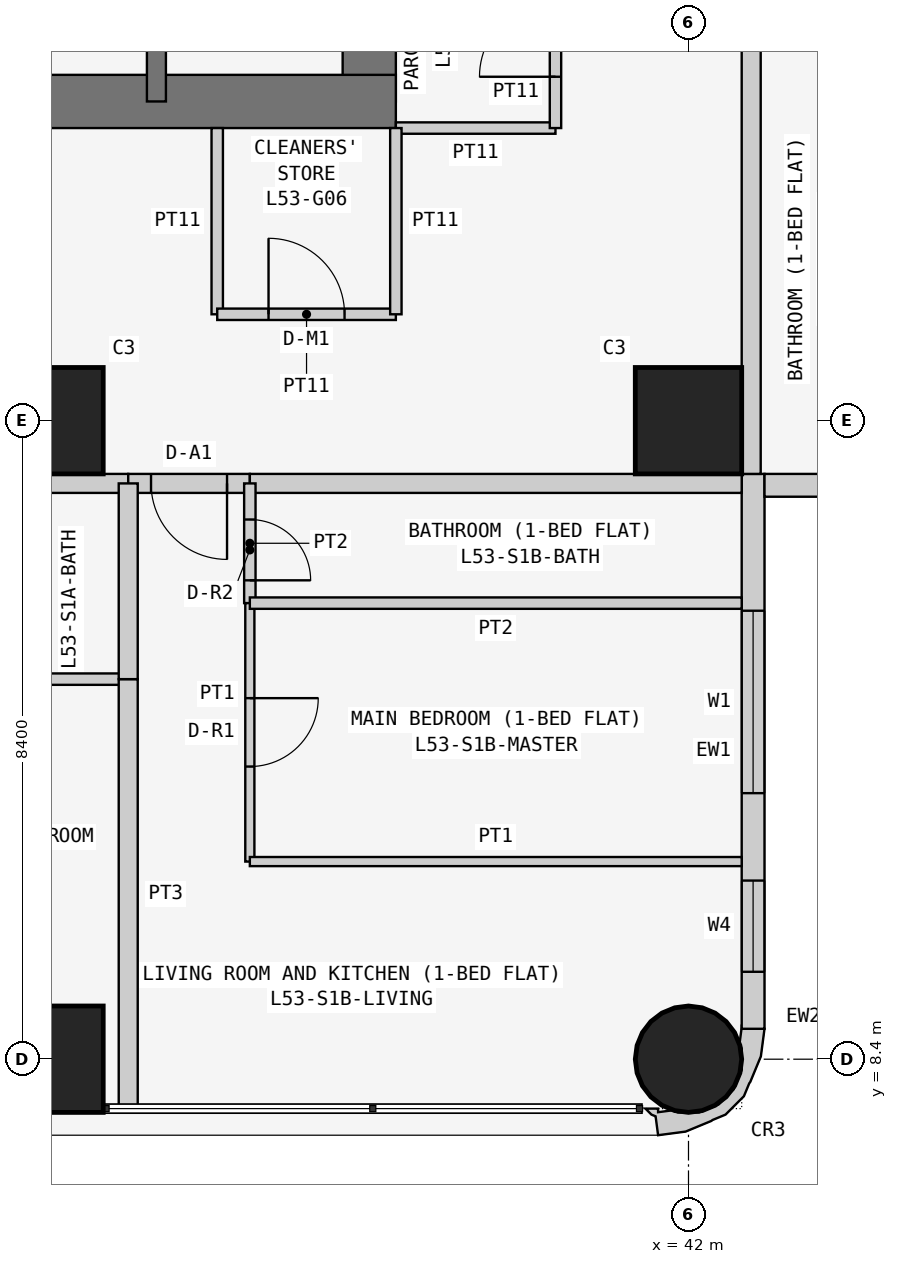
"""IFC4 building model, lengths in metres.
Left out: names, types, materials, properties, quantities, classifications, styles, units other than length and angle.
Written with IfcOpenShell. Run it as: python <this file> out.ifc"""

import sys

from ifc_helpers import new_model, si_unit, direction, frame, frame_2d, origin, origin_2d, place, context, subcontext, project, spatial, polyline, rectangle, circle, outline, extrude, element, fill, save


model = new_model("IFC4")
c1 = context("Model", 3, precision=1e-05, world=origin(), true_north=direction((0.0, 1.0)))
c2 = subcontext(c1, "Body", "Model", "MODEL_VIEW")
j1 = project(units=[si_unit("LENGTHUNIT", "METRE"), si_unit("PLANEANGLEUNIT", "RADIAN")], contexts=[c1])
p1 = place(None, origin())
s1 = spatial("IfcSite", under=j1, at=p1, CompositionType="ELEMENT")
p2 = place(p1, origin())
s2 = spatial("IfcBuilding", under=s1, at=p2, CompositionType="ELEMENT")
p3 = place(p2, frame((0.0, 0.0, 204.9)))
s3 = spatial("IfcBuildingStorey", under=s2, at=p3, CompositionType="ELEMENT", Elevation=204.9)
for number, where, z_axis, x_axis in (
    (1, (33.6, 8.4, 0.0), (0.0, 0.0, 1.0), (1.0, 0.0, 0.0)),
    (2, (33.6, 16.8, 0.0), (0.0, 0.0, 1.0), (1.0, 0.0, 0.0)),
):
    element("IfcColumn", number, at=place(p3, frame(where, z_axis=z_axis, x_axis=x_axis)), inside=s3, PredefinedType="COLUMN", context=c2, shape_type="SweptSolid", body=[
        extrude(rectangle(XDim=1.4, YDim=1.4, at=origin_2d()), origin(), (0.0, 0.0, 1.0), 3.6),
    ])
p4 = place(p3, frame((42.0, 8.4, 0.0), z_axis=(0.0, 0.0, 1.0), x_axis=(1.0, 0.0, 0.0)))
e3 = element("IfcColumn", 3, at=p4, inside=s3, PredefinedType="COLUMN", context=c2, shape_type="SweptSolid", body=[
    extrude(circle(Radius=0.7, at=origin_2d()), origin(), (0.0, 0.0, 1.0), 3.6),
])
p5 = place(p3, frame((42.0, 16.8, 0.0), z_axis=(0.0, 0.0, 1.0), x_axis=(1.0, 0.0, 0.0)))
e4 = element("IfcColumn", 4, at=p5, inside=s3, PredefinedType="COLUMN", context=c2, shape_type="SweptSolid", body=[
    extrude(rectangle(XDim=1.4, YDim=1.4, at=origin_2d()), origin(), (0.0, 0.0, 1.0), 3.6),
])
p6 = place(p3, frame((21.0, 21.0, 0.0), z_axis=(0.0, 0.0, 1.0), x_axis=(1.0, 0.0, 0.0)))
e5 = element("IfcWall", 5, at=p6, inside=s3, PredefinedType="SHEAR", context=c2, shape_type="SweptSolid", body=[
    extrude(rectangle(XDim=17.15, YDim=0.7, at=frame_2d((8.575, 0.0))), origin(), (0.0, 0.0, 1.0), 3.6),
])
p7 = place(p3, frame((37.8, 21.0, 0.0), z_axis=(0.0, 0.0, 1.0), x_axis=(0.0, 1.0, 0.0)))
e6 = element("IfcWall", 6, at=p7, inside=s3, PredefinedType="SHEAR", context=c2, shape_type="SweptSolid", body=[
    extrude(rectangle(XDim=17.15, YDim=0.7, at=frame_2d((8.575, 0.0))), origin(), (0.0, 0.0, 1.0), 3.6),
])
p8 = place(p7, frame((5.2, 0.0, 0.0)))
e7 = element("IfcOpeningElement", 7, at=p8, cuts=e6, PredefinedType="OPENING", context=c2, shape_type="SweptSolid", body=[
    extrude(rectangle(XDim=1.2, YDim=2.1, at=frame_2d((0.6, 1.05))), frame((0.0, 0.36, 0.0), z_axis=(0.0, -1.0, 0.0), x_axis=(1.0, 0.0, 0.0)), (0.0, 0.0, 1.0), 0.72),
])
p9 = place(p3, frame((35.0, 21.0, 0.0), z_axis=(0.0, 0.0, 1.0), x_axis=(0.0, 1.0, 0.0)))
e8 = element("IfcWall", 8, at=p9, inside=s3, PredefinedType="SHEAR", context=c2, shape_type="SweptSolid", body=[
    extrude(rectangle(XDim=3.2, YDim=0.25, at=frame_2d((1.6, 0.0))), origin(), (0.0, 0.0, 1.0), 3.6),
])
p10 = place(p3, frame((42.85, 8.8, 0.0), z_axis=(0.0, 0.0, 1.0), x_axis=(0.0, 1.0, 0.0)))
e9 = element("IfcWall", 9, at=p10, inside=s3, PredefinedType="SOLIDWALL", context=c2, shape_type="SweptSolid", body=[
    extrude(rectangle(XDim=7.3, YDim=0.3, at=frame_2d((3.65, 0.0))), origin(), (0.0, 0.0, 1.0), 3.45),
])
p11 = place(p10, frame((3.1, 0.0, 0.9)))
e10 = element("IfcOpeningElement", 10, at=p11, cuts=e9, PredefinedType="OPENING", context=c2, shape_type="SweptSolid", body=[
    extrude(rectangle(XDim=2.4, YDim=1.5, at=frame_2d((1.2, 0.75))), frame((0.0, 0.16, 0.0), z_axis=(0.0, -1.0, 0.0), x_axis=(1.0, 0.0, 0.0)), (0.0, 0.0, 1.0), 0.32),
])
p12 = place(p10, frame((0.75, 0.0, 0.9)))
e11 = element("IfcOpeningElement", 11, at=p12, cuts=e9, PredefinedType="OPENING", context=c2, shape_type="SweptSolid", body=[
    extrude(rectangle(XDim=1.2, YDim=1.5, at=frame_2d((0.6, 0.75))), frame((0.0, 0.16, 0.0), z_axis=(0.0, -1.0, 0.0), x_axis=(1.0, 0.0, 0.0)), (0.0, 0.0, 1.0), 0.32),
])
p13 = place(p3, frame((43.0, 15.95, 0.0), z_axis=(0.0, 0.0, 1.0), x_axis=(1.0, 0.0, 0.0)))
e12 = element("IfcWall", 12, at=p13, inside=s3, PredefinedType="SOLIDWALL", context=c2, shape_type="SweptSolid", body=[
    extrude(rectangle(XDim=7.0, YDim=0.3, at=frame_2d((3.5, 0.0))), origin(), (0.0, 0.0, 1.0), 3.45),
])
p14 = place(p13, frame((1.5, 0.0, 0.9)))
e13 = element("IfcOpeningElement", 13, at=p14, cuts=e12, PredefinedType="OPENING", context=c2, shape_type="SweptSolid", body=[
    extrude(rectangle(XDim=2.4, YDim=1.5, at=frame_2d((1.2, 0.75))), frame((0.0, 0.16, 0.0), z_axis=(0.0, -1.0, 0.0), x_axis=(1.0, 0.0, 0.0)), (0.0, 0.0, 1.0), 0.32),
])
p15 = place(p13, frame((5.05, 0.0, 0.9)))
e14 = element("IfcOpeningElement", 14, at=p15, cuts=e12, PredefinedType="OPENING", context=c2, shape_type="SweptSolid", body=[
    extrude(rectangle(XDim=1.2, YDim=1.5, at=frame_2d((0.6, 0.75))), frame((0.0, 0.16, 0.0), z_axis=(0.0, -1.0, 0.0), x_axis=(1.0, 0.0, 0.0)), (0.0, 0.0, 1.0), 0.32),
])
p16 = place(p3, frame((41.488, 7.812, 0.0), z_axis=(0.0, 0.0, 1.0), x_axis=(0.439933741929, -0.898030234854, 0.0)))
e15 = element("IfcWall", 15, at=p16, inside=s3, PredefinedType="SOLIDWALL", context=c2, shape_type="SweptSolid", body=[
    extrude(outline(polyline([(-0.222, 1.793), (-0.39, 1.541), (-0.372, 1.532), (-0.195, 1.414), (-0.12, 1.41), (0.131, 1.287), (0.315, 1.078), (0.406, 0.814), (0.388, 0.536), (0.265, 0.285), (0.209, 0.235), (0.148, 0.053), (0.105, 0.074), (0.032, -0.076), (0.138, -0.04), (0.182, -0.0), (0.419, -0.08), (0.536, 0.266), (0.559, 0.631), (0.555, 0.651), (0.566, 0.836), (0.455, 1.159), (0.333, 1.298), (0.324, 1.317), (0.082, 1.591), (-0.222, 1.793)])), origin(), (0.0, 0.0, 1.0), 3.45),
])
p17 = place(p3, frame((38.15, 20.65, 0.0), z_axis=(0.0, 0.0, 1.0), x_axis=(1.0, 0.0, 0.0)))
e16 = element("IfcWall", 16, at=p17, inside=s3, PredefinedType="PARTITIONING", context=c2, shape_type="SweptSolid", body=[
    extrude(rectangle(XDim=2.1, YDim=0.15, at=frame_2d((1.05, 0.0))), origin(), (0.0, 0.0, 1.0), 3.45),
])
p18 = place(p3, frame((40.25, 20.65, 0.0), z_axis=(0.0, 0.0, 1.0), x_axis=(0.0, 1.0, 0.0)))
e17 = element("IfcWall", 17, at=p18, inside=s3, PredefinedType="PARTITIONING", context=c2, shape_type="SweptSolid", body=[
    extrude(rectangle(XDim=2.35, YDim=0.15, at=frame_2d((1.175, 0.0))), origin(), (0.0, 0.0, 1.0), 3.45),
])
p19 = place(p18, frame((0.675, 0.0, 0.0)))
e18 = element("IfcOpeningElement", 18, at=p19, cuts=e17, PredefinedType="OPENING", context=c2, shape_type="SweptSolid", body=[
    extrude(rectangle(XDim=1.0, YDim=2.1, at=frame_2d((0.5, 1.05))), frame((0.0, 0.085, 0.0), z_axis=(0.0, -1.0, 0.0), x_axis=(1.0, 0.0, 0.0)), (0.0, 0.0, 1.0), 0.17),
])
p20 = place(p3, frame((35.8, 20.65, 0.0), z_axis=(0.0, 0.0, 1.0), x_axis=(0.0, -1.0, 0.0)))
e19 = element("IfcWall", 19, at=p20, inside=s3, PredefinedType="PARTITIONING", context=c2, shape_type="SweptSolid", body=[
    extrude(rectangle(XDim=2.45, YDim=0.15, at=frame_2d((1.225, 0.0))), origin(), (0.0, 0.0, 1.0), 3.45),
])
p21 = place(p3, frame((35.8, 18.2, 0.0), z_axis=(0.0, 0.0, 1.0), x_axis=(1.0, 0.0, 0.0)))
e20 = element("IfcWall", 20, at=p21, inside=s3, PredefinedType="PARTITIONING", context=c2, shape_type="SweptSolid", body=[
    extrude(rectangle(XDim=2.35, YDim=0.15, at=frame_2d((1.175, 0.0))), origin(), (0.0, 0.0, 1.0), 3.45),
])
p22 = place(p21, frame((0.675, 0.0, 0.0)))
e21 = element("IfcOpeningElement", 21, at=p22, cuts=e20, PredefinedType="OPENING", context=c2, shape_type="SweptSolid", body=[
    extrude(rectangle(XDim=1.0, YDim=2.1, at=frame_2d((0.5, 1.05))), frame((0.0, 0.085, 0.0), z_axis=(0.0, -1.0, 0.0), x_axis=(1.0, 0.0, 0.0)), (0.0, 0.0, 1.0), 0.17),
])
p23 = place(p3, frame((38.15, 18.2, 0.0), z_axis=(0.0, 0.0, 1.0), x_axis=(0.0, 1.0, 0.0)))
e22 = element("IfcWall", 22, at=p23, inside=s3, PredefinedType="PARTITIONING", context=c2, shape_type="SweptSolid", body=[
    extrude(rectangle(XDim=2.45, YDim=0.15, at=frame_2d((1.225, 0.0))), origin(), (0.0, 0.0, 1.0), 3.45),
])
p24 = place(p3, frame((42.825, 22.971, 0.0), z_axis=(0.0, 0.0, 1.0), x_axis=(0.0, -1.0, 0.0)))
e23 = element("IfcWall", 23, at=p24, inside=s3, PredefinedType="PARTITIONING", context=c2, shape_type="SweptSolid", body=[
    extrude(rectangle(XDim=6.871, YDim=0.25, at=frame_2d((3.436, 0.0))), origin(), (0.0, 0.0, 1.0), 3.45),
])
p25 = place(p3, frame((34.629, 15.975, 0.0), z_axis=(0.0, 0.0, 1.0), x_axis=(-1.0, 0.0, 0.0)))
e24 = element("IfcWall", 24, at=p25, inside=s3, PredefinedType="PARTITIONING", context=c2, shape_type="SweptSolid", body=[
    extrude(rectangle(XDim=2.629, YDim=0.25, at=frame_2d((1.314, 0.0))), origin(), (0.0, 0.0, 1.0), 3.45),
])
p26 = place(p3, frame((36.229, 15.975, 0.0), z_axis=(0.0, 0.0, 1.0), x_axis=(-1.0, 0.0, 0.0)))
e25 = element("IfcWall", 25, at=p26, inside=s3, PredefinedType="PARTITIONING", context=c2, shape_type="SweptSolid", body=[
    extrude(rectangle(XDim=1.6, YDim=0.25, at=frame_2d((0.8, 0.0))), origin(), (0.0, 0.0, 1.0), 3.45),
])
p27 = place(p26, frame((0.3, 0.0, 0.0)))
e26 = element("IfcOpeningElement", 26, at=p27, cuts=e25, PredefinedType="OPENING", context=c2, shape_type="SweptSolid", body=[
    extrude(rectangle(XDim=1.0, YDim=2.1, at=frame_2d((0.5, 1.05))), frame((0.0, 0.135, 0.0), z_axis=(0.0, -1.0, 0.0), x_axis=(1.0, 0.0, 0.0)), (0.0, 0.0, 1.0), 0.27),
])
p28 = place(p3, frame((42.7, 15.975, 0.0), z_axis=(0.0, 0.0, 1.0), x_axis=(-1.0, 0.0, 0.0)))
e27 = element("IfcWall", 27, at=p28, inside=s3, PredefinedType="PARTITIONING", context=c2, shape_type="SweptSolid", body=[
    extrude(rectangle(XDim=6.471, YDim=0.25, at=frame_2d((3.235, 0.0))), origin(), (0.0, 0.0, 1.0), 3.45),
])
p29 = place(p3, frame((32.0, 13.4, 0.0), z_axis=(0.0, 0.0, 1.0), x_axis=(1.0, 0.0, 0.0)))
e28 = element("IfcWall", 28, at=p29, inside=s3, PredefinedType="PARTITIONING", context=c2, shape_type="SweptSolid", body=[
    extrude(rectangle(XDim=2.629, YDim=0.15, at=frame_2d((1.314, 0.0))), origin(), (0.0, 0.0, 1.0), 3.45),
])
p30 = place(p3, frame((34.629, 13.4, 0.0), z_axis=(0.0, 0.0, 1.0), x_axis=(0.0, -1.0, 0.0)))
e29 = element("IfcWall", 29, at=p30, inside=s3, PredefinedType="PARTITIONING", context=c2, shape_type="SweptSolid", body=[
    extrude(rectangle(XDim=5.65, YDim=0.25, at=frame_2d((2.825, 0.0))), origin(), (0.0, 0.0, 1.0), 3.45),
])
p31 = place(p3, frame((34.629, 13.4, 0.0), z_axis=(0.0, 0.0, 1.0), x_axis=(0.0, 1.0, 0.0)))
e30 = element("IfcWall", 30, at=p31, inside=s3, PredefinedType="PARTITIONING", context=c2, shape_type="SweptSolid", body=[
    extrude(rectangle(XDim=2.575, YDim=0.25, at=frame_2d((1.288, 0.0))), origin(), (0.0, 0.0, 1.0), 3.45),
])
p32 = place(p3, frame((36.229, 15.975, 0.0), z_axis=(0.0, 0.0, 1.0), x_axis=(0.0, -1.0, 0.0)))
e31 = element("IfcWall", 31, at=p32, inside=s3, PredefinedType="PARTITIONING", context=c2, shape_type="SweptSolid", body=[
    extrude(rectangle(XDim=1.575, YDim=0.15, at=frame_2d((0.788, 0.0))), origin(), (0.0, 0.0, 1.0), 3.45),
])
p33 = place(p32, frame((0.475, 0.0, 0.0)))
e32 = element("IfcOpeningElement", 32, at=p33, cuts=e31, PredefinedType="OPENING", context=c2, shape_type="SweptSolid", body=[
    extrude(rectangle(XDim=0.8, YDim=2.1, at=frame_2d((0.4, 1.05))), frame((0.0, 0.085, 0.0), z_axis=(0.0, -1.0, 0.0), x_axis=(1.0, 0.0, 0.0)), (0.0, 0.0, 1.0), 0.17),
])
p34 = place(p3, frame((36.229, 14.4, 0.0), z_axis=(0.0, 0.0, 1.0), x_axis=(0.0, -1.0, 0.0)))
e33 = element("IfcWall", 33, at=p34, inside=s3, PredefinedType="PARTITIONING", context=c2, shape_type="SweptSolid", body=[
    extrude(rectangle(XDim=3.4, YDim=0.12, at=frame_2d((1.7, 0.0))), origin(), (0.0, 0.0, 1.0), 3.45),
])
p35 = place(p34, frame((1.25, 0.0, 0.0)))
e34 = element("IfcOpeningElement", 34, at=p35, cuts=e33, PredefinedType="OPENING", context=c2, shape_type="SweptSolid", body=[
    extrude(rectangle(XDim=0.9, YDim=2.1, at=frame_2d((0.45, 1.05))), frame((0.0, 0.07, 0.0), z_axis=(0.0, -1.0, 0.0), x_axis=(1.0, 0.0, 0.0)), (0.0, 0.0, 1.0), 0.14),
])
p36 = place(p3, frame((36.229, 11.0, 0.0), z_axis=(0.0, 0.0, 1.0), x_axis=(1.0, 0.0, 0.0)))
e35 = element("IfcWall", 35, at=p36, inside=s3, PredefinedType="PARTITIONING", context=c2, shape_type="SweptSolid", body=[
    extrude(rectangle(XDim=6.471, YDim=0.12, at=frame_2d((3.235, 0.0))), origin(), (0.0, 0.0, 1.0), 3.45),
])
p37 = place(p3, frame((36.229, 14.4, 0.0), z_axis=(0.0, 0.0, 1.0), x_axis=(1.0, 0.0, 0.0)))
e36 = element("IfcWall", 36, at=p37, inside=s3, PredefinedType="PARTITIONING", context=c2, shape_type="SweptSolid", body=[
    extrude(rectangle(XDim=6.471, YDim=0.15, at=frame_2d((3.235, 0.0))), origin(), (0.0, 0.0, 1.0), 3.45),
])
p38 = place(p11, origin())
e37 = element("IfcWindow", 37, at=p38, inside=s3, PartitioningType="SINGLE_PANEL", PredefinedType="WINDOW", context=c2, shape_type="SweptSolid", body=[
    extrude(rectangle(XDim=2.4, YDim=1.5, at=frame_2d((1.2, 0.75))), frame((0.0, 0.03, 0.0), z_axis=(0.0, -1.0, 0.0), x_axis=(1.0, 0.0, 0.0)), (0.0, 0.0, 1.0), 0.06),
])
fill(e10, e37)
p39 = place(p12, origin())
e38 = element("IfcWindow", 38, at=p39, inside=s3, PartitioningType="SINGLE_PANEL", PredefinedType="WINDOW", context=c2, shape_type="SweptSolid", body=[
    extrude(rectangle(XDim=1.2, YDim=1.5, at=frame_2d((0.6, 0.75))), frame((0.0, 0.03, 0.0), z_axis=(0.0, -1.0, 0.0), x_axis=(1.0, 0.0, 0.0)), (0.0, 0.0, 1.0), 0.06),
])
fill(e11, e38)
p40 = place(p19, origin())
e39 = element("IfcDoor", 39, at=p40, inside=s3, OperationType="SINGLE_SWING_LEFT", PredefinedType="DOOR", context=c2, shape_type="SweptSolid", body=[
    extrude(rectangle(XDim=1.0, YDim=2.1, at=frame_2d((0.5, 1.05))), frame((0.0, 0.025, 0.0), z_axis=(0.0, -1.0, 0.0), x_axis=(1.0, 0.0, 0.0)), (0.0, 0.0, 1.0), 0.05),
])
fill(e18, e39)
p41 = place(p22, origin())
e40 = element("IfcDoor", 40, at=p41, inside=s3, OperationType="SINGLE_SWING_LEFT", PredefinedType="DOOR", context=c2, shape_type="SweptSolid", body=[
    extrude(rectangle(XDim=1.0, YDim=2.1, at=frame_2d((0.5, 1.05))), frame((0.0, 0.025, 0.0), z_axis=(0.0, -1.0, 0.0), x_axis=(1.0, 0.0, 0.0)), (0.0, 0.0, 1.0), 0.05),
])
fill(e21, e40)
p42 = place(p27, origin())
e41 = element("IfcDoor", 41, at=p42, inside=s3, OperationType="SINGLE_SWING_LEFT", PredefinedType="DOOR", context=c2, shape_type="SweptSolid", body=[
    extrude(rectangle(XDim=1.0, YDim=2.1, at=frame_2d((0.5, 1.05))), frame((0.0, 0.025, 0.0), z_axis=(0.0, -1.0, 0.0), x_axis=(1.0, 0.0, 0.0)), (0.0, 0.0, 1.0), 0.05),
])
fill(e26, e41)
p43 = place(p33, origin())
e42 = element("IfcDoor", 42, at=p43, inside=s3, OperationType="SINGLE_SWING_RIGHT", PredefinedType="DOOR", context=c2, shape_type="SweptSolid", body=[
    extrude(rectangle(XDim=0.8, YDim=2.1, at=frame_2d((0.4, 1.05))), frame((0.0, 0.025, 0.0), z_axis=(0.0, -1.0, 0.0), x_axis=(1.0, 0.0, 0.0)), (0.0, 0.0, 1.0), 0.05),
])
fill(e32, e42)
p44 = place(p35, origin())
e43 = element("IfcDoor", 43, at=p44, inside=s3, OperationType="SINGLE_SWING_LEFT", PredefinedType="DOOR", context=c2, shape_type="SweptSolid", body=[
    extrude(rectangle(XDim=0.9, YDim=2.1, at=frame_2d((0.45, 1.05))), frame((0.0, 0.025, 0.0), z_axis=(0.0, -1.0, 0.0), x_axis=(1.0, 0.0, 0.0)), (0.0, 0.0, 1.0), 0.05),
])
fill(e34, e43)
save(model, sys.argv[1])
